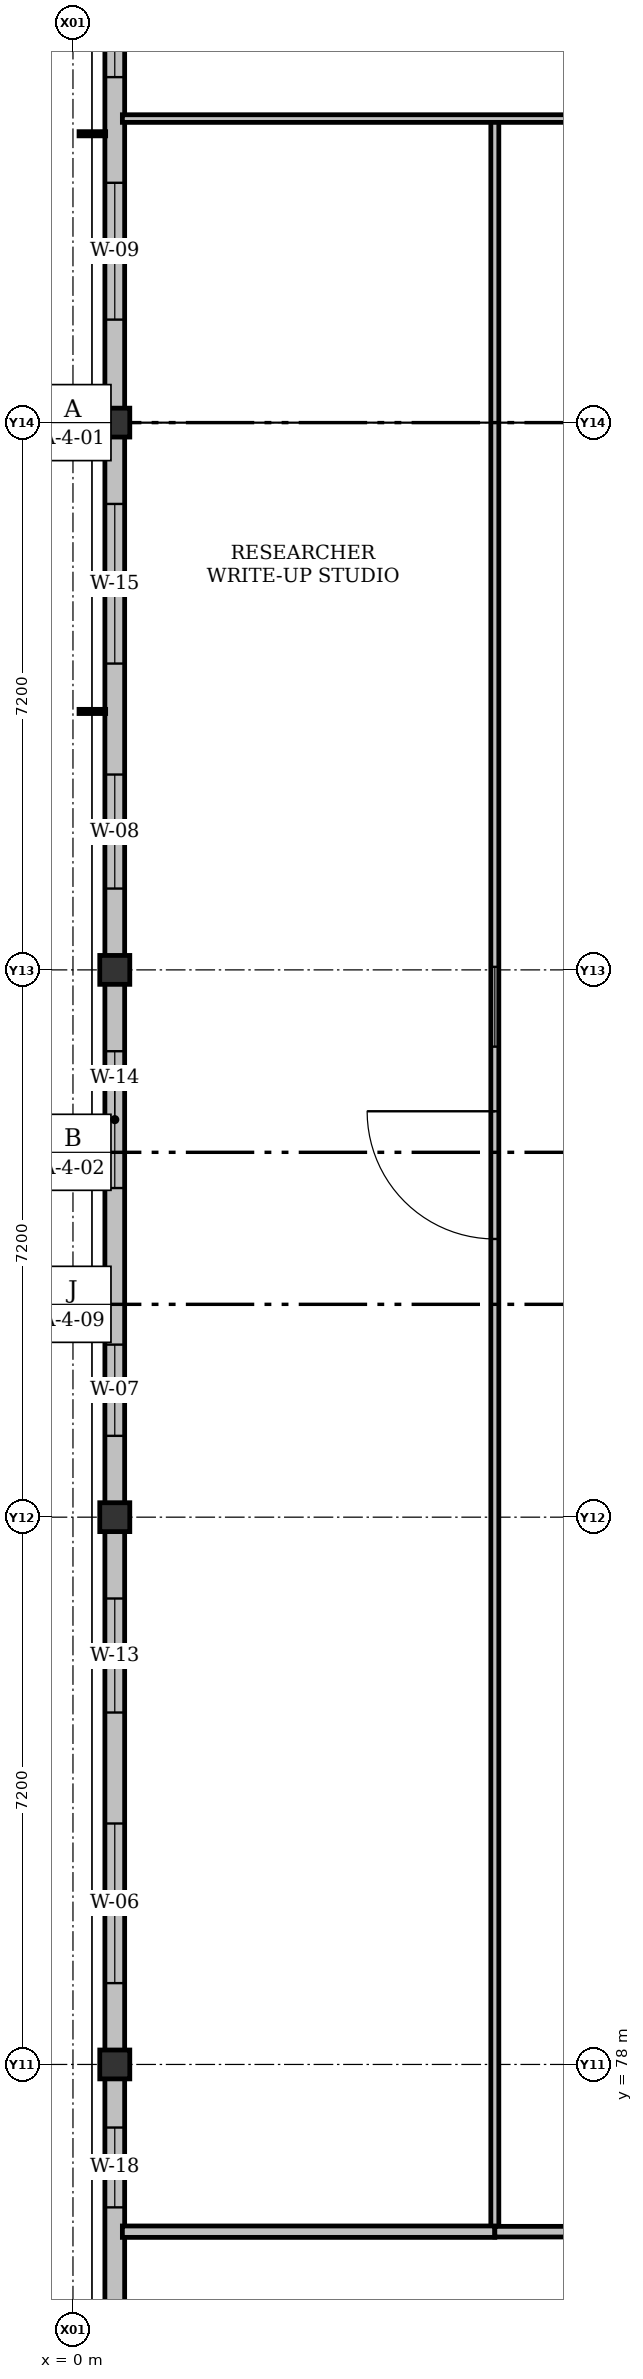
"""IFC4 building model, lengths in metres.
Left out: names, types, materials, properties, quantities, classifications, styles, units other than length and angle.
Written with IfcOpenShell. Run it as: python <this file> out.ifc"""

import sys

from ifc_helpers import new_model, si_unit, direction, frame, frame_2d, origin, origin_2d, place, context, subcontext, project, spatial, rectangle, i_section, extrude, element, fill, save


model = new_model("IFC4")
c1 = context("Model", 3, precision=1e-05, world=origin(), true_north=direction((0.0, 1.0)))
c2 = subcontext(c1, "Body", "Model", "MODEL_VIEW")
j1 = project(units=[si_unit("LENGTHUNIT", "METRE"), si_unit("PLANEANGLEUNIT", "RADIAN")], contexts=[c1])
p1 = place(None, origin())
s1 = spatial("IfcSite", under=j1, at=p1, CompositionType="ELEMENT")
p2 = place(p1, origin())
s2 = spatial("IfcBuilding", under=s1, at=p2, CompositionType="ELEMENT")
p3 = place(p2, frame((0.0, 0.0, 14.1)))
s3 = spatial("IfcBuildingStorey", under=s2, at=p3, CompositionType="ELEMENT", Elevation=14.1)
for number, where, z_axis, x_axis in (
    (1, (0.55, 78.0, 0.0), (0.0, 0.0, 1.0), (1.0, 0.0, 0.0)),
    (2, (0.55, 85.2, 0.0), (0.0, 0.0, 1.0), (1.0, 0.0, 0.0)),
    (3, (0.55, 92.4, 0.0), (0.0, 0.0, 1.0), (1.0, 0.0, 0.0)),
    (4, (0.55, 99.6, 0.0), (0.0, 0.0, 1.0), (1.0, 0.0, 0.0)),
):
    element("IfcColumn", number, at=place(p3, frame(where, z_axis=z_axis, x_axis=x_axis)), inside=s3, PredefinedType="COLUMN", context=c2, shape_type="SweptSolid", body=[
        extrude(i_section(OverallWidth=0.395, OverallDepth=0.38, WebThickness=0.019, FlangeThickness=0.03, FilletRadius=0.015, at=origin_2d()), origin(), (0.0, 0.0, 1.0), 4.2),
    ])
p4 = place(p3, frame((0.55, 70.5, 0.0), z_axis=(0.0, 0.0, 1.0), x_axis=(0.0, 1.0, 0.0)))
e5 = element("IfcWall", 5, at=p4, inside=s3, PredefinedType="SOLIDWALL", context=c2, shape_type="SweptSolid", body=[
    extrude(rectangle(XDim=7.5, YDim=0.26, at=frame_2d((3.75, 0.0))), origin(), (0.0, 0.0, 1.0), 3.577),
])
p5 = place(p4, frame((2.005, 0.0, 0.92)))
e6 = element("IfcOpeningElement", 6, at=p5, cuts=e5, PredefinedType="OPENING", context=c2, shape_type="SweptSolid", body=[
    extrude(rectangle(XDim=1.8, YDim=1.4, at=frame_2d((0.9, 0.7))), frame((0.0, 0.13, 0.0), z_axis=(0.0, -1.0, 0.0), x_axis=(1.0, 0.0, 0.0)), (0.0, 0.0, 1.0), 0.26),
])
p6 = place(p4, frame((5.62, 0.0, 0.92)))
e7 = element("IfcOpeningElement", 7, at=p6, cuts=e5, PredefinedType="OPENING", context=c2, shape_type="SweptSolid", body=[
    extrude(rectangle(XDim=1.05, YDim=1.3, at=frame_2d((0.525, 0.65))), frame((0.0, 0.13, 0.0), z_axis=(0.0, -1.0, 0.0), x_axis=(1.0, 0.0, 0.0)), (0.0, 0.0, 1.0), 0.26),
])
p7 = place(p3, frame((0.55, 78.0, 0.0), z_axis=(0.0, 0.0, 1.0), x_axis=(0.0, 1.0, 0.0)))
e8 = element("IfcWall", 8, at=p7, inside=s3, PredefinedType="SOLIDWALL", context=c2, shape_type="SweptSolid", body=[
    extrude(rectangle(XDim=7.2, YDim=0.26, at=frame_2d((3.6, 0.0))), origin(), (0.0, 0.0, 1.0), 3.577),
])
p8 = place(p7, frame((1.07, 0.0, 0.92)))
e9 = element("IfcOpeningElement", 9, at=p8, cuts=e8, PredefinedType="OPENING", context=c2, shape_type="SweptSolid", body=[
    extrude(rectangle(XDim=2.1, YDim=1.4, at=frame_2d((1.05, 0.7))), frame((0.0, 0.13, 0.0), z_axis=(0.0, -1.0, 0.0), x_axis=(1.0, 0.0, 0.0)), (0.0, 0.0, 1.0), 0.26),
])
p9 = place(p7, frame((4.63, 0.0, 0.92)))
e10 = element("IfcOpeningElement", 10, at=p9, cuts=e8, PredefinedType="OPENING", context=c2, shape_type="SweptSolid", body=[
    extrude(rectangle(XDim=1.5, YDim=1.7, at=frame_2d((0.75, 0.85))), frame((0.0, 0.13, 0.0), z_axis=(0.0, -1.0, 0.0), x_axis=(1.0, 0.0, 0.0)), (0.0, 0.0, 1.0), 0.26),
])
p10 = place(p3, frame((0.55, 85.2, 0.0), z_axis=(0.0, 0.0, 1.0), x_axis=(0.0, 1.0, 0.0)))
e11 = element("IfcWall", 11, at=p10, inside=s3, PredefinedType="SOLIDWALL", context=c2, shape_type="SweptSolid", body=[
    extrude(rectangle(XDim=7.2, YDim=0.26, at=frame_2d((3.6, 0.0))), origin(), (0.0, 0.0, 1.0), 3.577),
])
p11 = place(p10, frame((1.07, 0.0, 0.92)))
e12 = element("IfcOpeningElement", 12, at=p11, cuts=e11, PredefinedType="OPENING", context=c2, shape_type="SweptSolid", body=[
    extrude(rectangle(XDim=1.2, YDim=1.55, at=frame_2d((0.6, 0.775))), frame((0.0, 0.13, 0.0), z_axis=(0.0, -1.0, 0.0), x_axis=(1.0, 0.0, 0.0)), (0.0, 0.0, 1.0), 0.26),
])
p12 = place(p10, frame((4.33, 0.0, 0.92)))
e13 = element("IfcOpeningElement", 13, at=p12, cuts=e11, PredefinedType="OPENING", context=c2, shape_type="SweptSolid", body=[
    extrude(rectangle(XDim=1.8, YDim=1.7, at=frame_2d((0.9, 0.85))), frame((0.0, 0.13, 0.0), z_axis=(0.0, -1.0, 0.0), x_axis=(1.0, 0.0, 0.0)), (0.0, 0.0, 1.0), 0.26),
])
p13 = place(p3, frame((0.55, 92.4, 0.0), z_axis=(0.0, 0.0, 1.0), x_axis=(0.0, 1.0, 0.0)))
e14 = element("IfcWall", 14, at=p13, inside=s3, PredefinedType="SOLIDWALL", context=c2, shape_type="SweptSolid", body=[
    extrude(rectangle(XDim=7.2, YDim=0.26, at=frame_2d((3.6, 0.0))), origin(), (0.0, 0.0, 1.0), 3.577),
])
p14 = place(p13, frame((1.07, 0.0, 0.92)))
e15 = element("IfcOpeningElement", 15, at=p14, cuts=e14, PredefinedType="OPENING", context=c2, shape_type="SweptSolid", body=[
    extrude(rectangle(XDim=1.5, YDim=1.55, at=frame_2d((0.75, 0.775))), frame((0.0, 0.13, 0.0), z_axis=(0.0, -1.0, 0.0), x_axis=(1.0, 0.0, 0.0)), (0.0, 0.0, 1.0), 0.26),
])
p15 = place(p13, frame((4.03, 0.0, 0.92)))
e16 = element("IfcOpeningElement", 16, at=p15, cuts=e14, PredefinedType="OPENING", context=c2, shape_type="SweptSolid", body=[
    extrude(rectangle(XDim=2.1, YDim=1.7, at=frame_2d((1.05, 0.85))), frame((0.0, 0.13, 0.0), z_axis=(0.0, -1.0, 0.0), x_axis=(1.0, 0.0, 0.0)), (0.0, 0.0, 1.0), 0.26),
])
p16 = place(p3, frame((0.55, 99.6, 0.0), z_axis=(0.0, 0.0, 1.0), x_axis=(0.0, 1.0, 0.0)))
e17 = element("IfcWall", 17, at=p16, inside=s3, PredefinedType="SOLIDWALL", context=c2, shape_type="SweptSolid", body=[
    extrude(rectangle(XDim=7.2, YDim=0.26, at=frame_2d((3.6, 0.0))), origin(), (0.0, 0.0, 1.0), 3.577),
])
p17 = place(p16, frame((1.355, 0.0, 0.92)))
e18 = element("IfcOpeningElement", 18, at=p17, cuts=e17, PredefinedType="OPENING", context=c2, shape_type="SweptSolid", body=[
    extrude(rectangle(XDim=1.8, YDim=1.55, at=frame_2d((0.9, 0.775))), frame((0.0, 0.13, 0.0), z_axis=(0.0, -1.0, 0.0), x_axis=(1.0, 0.0, 0.0)), (0.0, 0.0, 1.0), 0.26),
])
p18 = place(p16, frame((4.545, 0.0, 0.92)))
e19 = element("IfcOpeningElement", 19, at=p18, cuts=e17, PredefinedType="OPENING", context=c2, shape_type="SweptSolid", body=[
    extrude(rectangle(XDim=1.6, YDim=1.35, at=frame_2d((0.8, 0.675))), frame((0.0, 0.13, 0.0), z_axis=(0.0, -1.0, 0.0), x_axis=(1.0, 0.0, 0.0)), (0.0, 0.0, 1.0), 0.26),
])
p19 = place(p3, frame((5.55, 75.8, 0.0), z_axis=(0.0, 0.0, 1.0), x_axis=(0.0, 1.0, 0.0)))
e20 = element("IfcWall", 20, at=p19, inside=s3, PredefinedType="PARTITIONING", context=c2, shape_type="SweptSolid", body=[
    extrude(rectangle(XDim=27.8, YDim=0.105, at=frame_2d((13.9, 0.0))), origin(), (0.0, 0.0, 1.0), 3.451),
])
p20 = place(p19, frame((13.06, 0.0, 0.0)))
e21 = element("IfcOpeningElement", 21, at=p20, cuts=e20, PredefinedType="OPENING", context=c2, shape_type="SweptSolid", body=[
    extrude(rectangle(XDim=1.68, YDim=2.35, at=frame_2d((0.84, 1.175))), frame((0.0, 0.052, 0.0), z_axis=(0.0, -1.0, 0.0), x_axis=(1.0, 0.0, 0.0)), (0.0, 0.0, 1.0), 0.105),
])
p21 = place(p19, frame((15.59, 0.0, 0.92)))
e22 = element("IfcOpeningElement", 22, at=p21, cuts=e20, PredefinedType="OPENING", context=c2, shape_type="SweptSolid", body=[
    extrude(rectangle(XDim=1.05, YDim=1.2, at=frame_2d((0.525, 0.6))), frame((0.0, 0.052, 0.0), z_axis=(0.0, -1.0, 0.0), x_axis=(1.0, 0.0, 0.0)), (0.0, 0.0, 1.0), 0.105),
])
p22 = place(p3, frame((0.65, 103.6, 0.0), z_axis=(0.0, 0.0, 1.0), x_axis=(1.0, 0.0, 0.0)))
e23 = element("IfcWall", 23, at=p22, inside=s3, PredefinedType="PARTITIONING", context=c2, shape_type="SweptSolid", body=[
    extrude(rectangle(XDim=19.1, YDim=0.1, at=frame_2d((9.55, 0.0))), origin(), (0.0, 0.0, 1.0), 3.527),
])
p23 = place(p22, frame((9.49, 0.0, 0.0)))
e24 = element("IfcOpeningElement", 24, at=p23, cuts=e23, PredefinedType="OPENING", context=c2, shape_type="SweptSolid", body=[
    extrude(rectangle(XDim=0.92, YDim=2.1, at=frame_2d((0.46, 1.05))), frame((0.0, 0.05, 0.0), z_axis=(0.0, -1.0, 0.0), x_axis=(1.0, 0.0, 0.0)), (0.0, 0.0, 1.0), 0.1),
])
p24 = place(p22, frame((11.26, 0.0, 0.92)))
e25 = element("IfcOpeningElement", 25, at=p24, cuts=e23, PredefinedType="OPENING", context=c2, shape_type="SweptSolid", body=[
    extrude(rectangle(XDim=1.2, YDim=1.2, at=frame_2d((0.6, 0.6))), frame((0.0, 0.05, 0.0), z_axis=(0.0, -1.0, 0.0), x_axis=(1.0, 0.0, 0.0)), (0.0, 0.0, 1.0), 0.1),
])
p25 = place(p3, frame((0.65, 75.8, 0.0), z_axis=(0.0, 0.0, 1.0), x_axis=(1.0, 0.0, 0.0)))
e26 = element("IfcWall", 26, at=p25, inside=s3, PredefinedType="PARTITIONING", context=c2, shape_type="SweptSolid", body=[
    extrude(rectangle(XDim=4.9, YDim=0.15, at=frame_2d((2.45, 0.0))), origin(), (0.0, 0.0, 1.0), 3.95),
])
p26 = place(p3, frame((19.75, 75.8, 0.0), z_axis=(0.0, 0.0, 1.0), x_axis=(-1.0, 0.0, 0.0)))
e27 = element("IfcWall", 27, at=p26, inside=s3, PredefinedType="PARTITIONING", context=c2, shape_type="SweptSolid", body=[
    extrude(rectangle(XDim=14.2, YDim=0.14, at=frame_2d((7.1, 0.0))), origin(), (0.0, 0.0, 1.0), 3.527),
])
p27 = place(p26, frame((8.05, 0.0, 0.0)))
e28 = element("IfcOpeningElement", 28, at=p27, cuts=e27, PredefinedType="OPENING", context=c2, shape_type="SweptSolid", body=[
    extrude(rectangle(XDim=1.0, YDim=2.1, at=frame_2d((0.5, 1.05))), frame((0.0, 0.07, 0.0), z_axis=(0.0, -1.0, 0.0), x_axis=(1.0, 0.0, 0.0)), (0.0, 0.0, 1.0), 0.14),
])
p28 = place(p26, frame((9.9, 0.0, 0.92)))
e29 = element("IfcOpeningElement", 29, at=p28, cuts=e27, PredefinedType="OPENING", context=c2, shape_type="SweptSolid", body=[
    extrude(rectangle(XDim=1.0, YDim=1.3, at=frame_2d((0.5, 0.65))), frame((0.0, 0.07, 0.0), z_axis=(0.0, -1.0, 0.0), x_axis=(1.0, 0.0, 0.0)), (0.0, 0.0, 1.0), 0.14),
])
p29 = place(p6, origin())
e30 = element("IfcWindow", 30, at=p29, inside=s3, PartitioningType="SINGLE_PANEL", PredefinedType="WINDOW", context=c2, shape_type="SweptSolid", body=[
    extrude(rectangle(XDim=1.05, YDim=1.3, at=frame_2d((0.525, 0.65))), frame((0.0, 0.03, 0.0), z_axis=(0.0, -1.0, 0.0), x_axis=(1.0, 0.0, 0.0)), (0.0, 0.0, 1.0), 0.06),
])
fill(e7, e30)
p30 = place(p8, origin())
e31 = element("IfcWindow", 31, at=p30, inside=s3, PartitioningType="DOUBLE_PANEL_VERTICAL", PredefinedType="WINDOW", context=c2, shape_type="SweptSolid", body=[
    extrude(rectangle(XDim=2.1, YDim=1.4, at=frame_2d((1.05, 0.7))), frame((0.0, 0.03, 0.0), z_axis=(0.0, -1.0, 0.0), x_axis=(1.0, 0.0, 0.0)), (0.0, 0.0, 1.0), 0.06),
])
fill(e9, e31)
p31 = place(p9, origin())
e32 = element("IfcWindow", 32, at=p31, inside=s3, PartitioningType="SINGLE_PANEL", PredefinedType="WINDOW", context=c2, shape_type="SweptSolid", body=[
    extrude(rectangle(XDim=1.5, YDim=1.7, at=frame_2d((0.75, 0.85))), frame((0.0, 0.03, 0.0), z_axis=(0.0, -1.0, 0.0), x_axis=(1.0, 0.0, 0.0)), (0.0, 0.0, 1.0), 0.06),
])
fill(e10, e32)
p32 = place(p11, origin())
e33 = element("IfcWindow", 33, at=p32, inside=s3, PartitioningType="SINGLE_PANEL", PredefinedType="WINDOW", context=c2, shape_type="SweptSolid", body=[
    extrude(rectangle(XDim=1.2, YDim=1.55, at=frame_2d((0.6, 0.775))), frame((0.0, 0.03, 0.0), z_axis=(0.0, -1.0, 0.0), x_axis=(1.0, 0.0, 0.0)), (0.0, 0.0, 1.0), 0.06),
])
fill(e12, e33)
p33 = place(p12, origin())
e34 = element("IfcWindow", 34, at=p33, inside=s3, PartitioningType="DOUBLE_PANEL_VERTICAL", PredefinedType="WINDOW", context=c2, shape_type="SweptSolid", body=[
    extrude(rectangle(XDim=1.8, YDim=1.7, at=frame_2d((0.9, 0.85))), frame((0.0, 0.03, 0.0), z_axis=(0.0, -1.0, 0.0), x_axis=(1.0, 0.0, 0.0)), (0.0, 0.0, 1.0), 0.06),
])
fill(e13, e34)
p34 = place(p14, origin())
e35 = element("IfcWindow", 35, at=p34, inside=s3, PartitioningType="SINGLE_PANEL", PredefinedType="WINDOW", context=c2, shape_type="SweptSolid", body=[
    extrude(rectangle(XDim=1.5, YDim=1.55, at=frame_2d((0.75, 0.775))), frame((0.0, 0.03, 0.0), z_axis=(0.0, -1.0, 0.0), x_axis=(1.0, 0.0, 0.0)), (0.0, 0.0, 1.0), 0.06),
])
fill(e15, e35)
p35 = place(p15, origin())
e36 = element("IfcWindow", 36, at=p35, inside=s3, PartitioningType="DOUBLE_PANEL_VERTICAL", PredefinedType="WINDOW", context=c2, shape_type="SweptSolid", body=[
    extrude(rectangle(XDim=2.1, YDim=1.7, at=frame_2d((1.05, 0.85))), frame((0.0, 0.03, 0.0), z_axis=(0.0, -1.0, 0.0), x_axis=(1.0, 0.0, 0.0)), (0.0, 0.0, 1.0), 0.06),
])
fill(e16, e36)
p36 = place(p17, origin())
e37 = element("IfcWindow", 37, at=p36, inside=s3, PartitioningType="DOUBLE_PANEL_VERTICAL", PredefinedType="WINDOW", context=c2, shape_type="SweptSolid", body=[
    extrude(rectangle(XDim=1.8, YDim=1.55, at=frame_2d((0.9, 0.775))), frame((0.0, 0.03, 0.0), z_axis=(0.0, -1.0, 0.0), x_axis=(1.0, 0.0, 0.0)), (0.0, 0.0, 1.0), 0.06),
])
fill(e18, e37)
p37 = place(p18, origin())
e38 = element("IfcWindow", 38, at=p37, inside=s3, PartitioningType="DOUBLE_PANEL_VERTICAL", PredefinedType="WINDOW", context=c2, shape_type="SweptSolid", body=[
    extrude(rectangle(XDim=1.6, YDim=1.35, at=frame_2d((0.8, 0.675))), frame((0.0, 0.03, 0.0), z_axis=(0.0, -1.0, 0.0), x_axis=(1.0, 0.0, 0.0)), (0.0, 0.0, 1.0), 0.06),
])
fill(e19, e38)
p38 = place(p20, origin())
e39 = element("IfcDoor", 39, at=p38, inside=s3, OperationType="SINGLE_SWING_RIGHT", PredefinedType="DOOR", context=c2, shape_type="SweptSolid", body=[
    extrude(rectangle(XDim=1.68, YDim=2.35, at=frame_2d((0.84, 1.175))), frame((0.0, 0.025, 0.0), z_axis=(0.0, -1.0, 0.0), x_axis=(1.0, 0.0, 0.0)), (0.0, 0.0, 1.0), 0.05),
])
fill(e21, e39)
p39 = place(p21, origin())
e40 = element("IfcWindow", 40, at=p39, inside=s3, PartitioningType="SINGLE_PANEL", PredefinedType="WINDOW", context=c2, shape_type="SweptSolid", body=[
    extrude(rectangle(XDim=1.05, YDim=1.2, at=frame_2d((0.525, 0.6))), frame((0.0, 0.03, 0.0), z_axis=(0.0, -1.0, 0.0), x_axis=(1.0, 0.0, 0.0)), (0.0, 0.0, 1.0), 0.06),
])
fill(e22, e40)
save(model, sys.argv[1])
